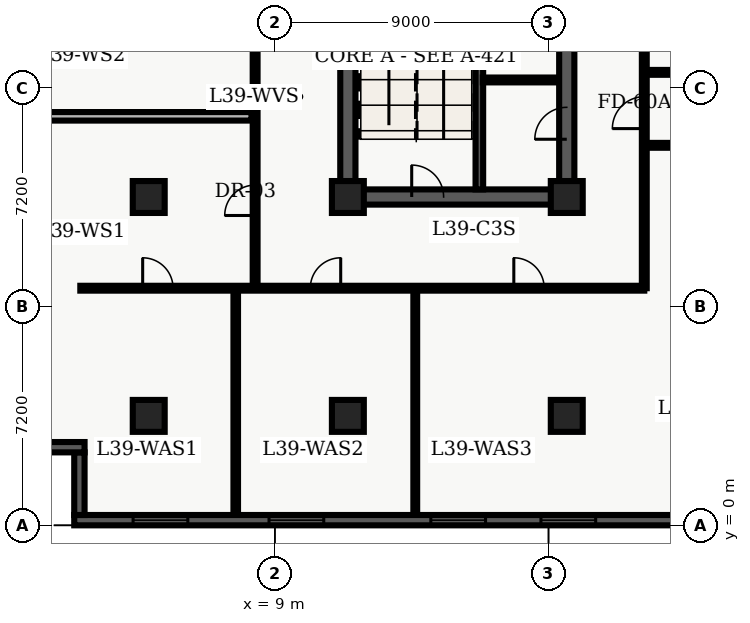
"""IFC4 building model, lengths in metres.
Left out: names, types, materials, properties, quantities, classifications, styles, units other than length and angle.
Written with IfcOpenShell. Run it as: python <this file> out.ifc"""

import sys

from ifc_helpers import new_model, entity, si_unit, converted_unit, direction, frame, origin_with_axes, origin_2d_with_axis, place, context, subcontext, project, spatial, polyline, rectangle, outline, extrude, element, fill, save


model = new_model("IFC4")
c1 = context("Model", 3, precision=1e-05, world=origin_with_axes(), true_north=direction((0.0, 1.0)))
c2 = subcontext(c1, "Body", "Model", "MODEL_VIEW")
j1 = project(units=[si_unit("LENGTHUNIT", "METRE"), converted_unit("PLANEANGLEUNIT", "DEGREE", entity("IfcPlaneAngleMeasure", 0.017), si_unit("PLANEANGLEUNIT", "RADIAN"), dimensions=[0, 0, 0, 0, 0, 0, 0])], contexts=[c1])
p1 = place(None, origin_with_axes())
s1 = spatial("IfcSite", under=j1, at=p1, CompositionType="ELEMENT")
p2 = place(p1, origin_with_axes())
s2 = spatial("IfcBuilding", under=s1, at=p2, CompositionType="ELEMENT")
p3 = place(p2, frame((0.0, 0.0, 160.2), z_axis=(0.0, 0.0, 1.0), x_axis=(1.0, 0.0, 0.0)))
s3 = spatial("IfcBuildingStorey", under=s2, at=p3, CompositionType="ELEMENT", Elevation=160.2)
p4 = place(p3, frame((11.4, 10.8, 0.0), z_axis=(0.0, 0.0, 1.0), x_axis=(0.0, 1.0, 0.0)))
e1 = element("IfcWall", 1, at=p4, inside=s3, PredefinedType="SHEAR", context=c2, shape_type="SweptSolid", body=[
    extrude(outline(polyline([(0.0, -0.25), (27.0, -0.25), (27.0, 0.25), (0.0, 0.25), (0.0, -0.25)])), origin_with_axes(), (0.0, 0.0, 1.0), 3.66),
])
p5 = place(p3, frame((11.4, 10.8, 0.0), z_axis=(0.0, 0.0, 1.0), x_axis=(1.0, 0.0, 0.0)))
e2 = element("IfcWall", 2, at=p5, inside=s3, PredefinedType="SHEAR", context=c2, shape_type="SweptSolid", body=[
    extrude(outline(polyline([(0.0, -0.25), (7.2, -0.25), (7.2, 0.25), (0.0, 0.25), (0.0, -0.25)])), origin_with_axes(), (0.0, 0.0, 1.0), 3.66),
])
p6 = place(p5, frame((2.625, 0.0, 0.0), z_axis=(0.0, 0.0, 1.0), x_axis=(1.0, 0.0, 0.0)))
e3 = element("IfcOpeningElement", 3, at=p6, cuts=e2, PredefinedType="OPENING", context=c2, shape_type="SweptSolid", body=[
    extrude(rectangle(XDim=1.05, YDim=0.52, at=origin_2d_with_axis()), origin_with_axes(), (0.0, 0.0, 1.0), 2.15),
])
p7 = place(p3, frame((18.6, 10.8, 0.0), z_axis=(0.0, 0.0, 1.0), x_axis=(0.0, 1.0, 0.0)))
e4 = element("IfcWall", 4, at=p7, inside=s3, PredefinedType="SHEAR", context=c2, shape_type="SweptSolid", body=[
    extrude(outline(polyline([(0.0, -0.25), (13.5, -0.25), (13.5, 0.25), (0.0, 0.25), (0.0, -0.25)])), origin_with_axes(), (0.0, 0.0, 1.0), 3.66),
])
p8 = place(p7, frame((11.125, 0.0, 0.0), z_axis=(0.0, 0.0, 1.0), x_axis=(1.0, 0.0, 0.0)))
e5 = element("IfcOpeningElement", 5, at=p8, cuts=e4, PredefinedType="OPENING", context=c2, shape_type="SweptSolid", body=[
    extrude(rectangle(XDim=1.05, YDim=0.52, at=origin_2d_with_axis()), origin_with_axes(), (0.0, 0.0, 1.0), 2.15),
])
p9 = place(p7, frame((2.425, 0.0, 0.0), z_axis=(0.0, 0.0, 1.0), x_axis=(1.0, 0.0, 0.0)))
e6 = element("IfcOpeningElement", 6, at=p9, cuts=e4, PredefinedType="OPENING", context=c2, shape_type="SweptSolid", body=[
    extrude(rectangle(XDim=1.05, YDim=0.52, at=origin_2d_with_axis()), origin_with_axes(), (0.0, 0.0, 1.0), 2.15),
])
p10 = place(p7, frame((6.625, 0.0, 0.0), z_axis=(0.0, 0.0, 1.0), x_axis=(1.0, 0.0, 0.0)))
e7 = element("IfcOpeningElement", 7, at=p10, cuts=e4, PredefinedType="OPENING", context=c2, shape_type="SweptSolid", body=[
    extrude(rectangle(XDim=1.05, YDim=0.52, at=origin_2d_with_axis()), origin_with_axes(), (0.0, 0.0, 1.0), 2.15),
])
p11 = place(p3, frame((15.725, 11.05, 0.0), z_axis=(0.0, 0.0, 1.0), x_axis=(0.0, 1.0, 0.0)))
e8 = element("IfcWall", 8, at=p11, inside=s3, PredefinedType="SHEAR", context=c2, shape_type="SweptSolid", body=[
    extrude(outline(polyline([(0.0, -0.125), (8.65, -0.125), (8.65, 0.125), (0.0, 0.125), (0.0, -0.125)])), origin_with_axes(), (0.0, 0.0, 1.0), 3.66),
])
for number, where, z_axis, x_axis in (
    (9, (11.4, 3.6, 0.0), (0.0, 0.0, 1.0), (1.0, 0.0, 0.0)),
    (10, (11.4, 10.8, 0.0), (0.0, 0.0, 1.0), (1.0, 0.0, 0.0)),
    (11, (18.6, 3.6, 0.0), (0.0, 0.0, 1.0), (1.0, 0.0, 0.0)),
    (12, (18.6, 10.8, 0.0), (0.0, 0.0, 1.0), (1.0, 0.0, 0.0)),
    (13, (4.85, 3.6, 0.0), (0.0, 0.0, 1.0), (1.0, 0.0, 0.0)),
    (14, (4.85, 10.8, 0.0), (0.0, 0.0, 1.0), (1.0, 0.0, 0.0)),
):
    element("IfcColumn", number, at=place(p3, frame(where, z_axis=z_axis, x_axis=x_axis)), inside=s3, PredefinedType="COLUMN", context=c2, shape_type="SweptSolid", body=[
        extrude(rectangle(XDim=1.05, YDim=1.05, at=origin_2d_with_axis()), origin_with_axes(), (0.0, 0.0, 1.0), 3.9),
    ])
p12 = place(p3, frame((15.84, 14.65, 0.0), z_axis=(0.0, 0.0, 1.0), x_axis=(1.0, 0.0, 0.0)))
e15 = element("IfcWall", 15, at=p12, inside=s3, PredefinedType="PARTITIONING", context=c2, shape_type="SweptSolid", body=[
    extrude(outline(polyline([(0.0, -0.08), (2.46, -0.08), (2.46, 0.08), (0.0, 0.08), (0.0, -0.08)])), origin_with_axes(), (0.0, 0.0, 1.0), 2.7),
])
p13 = place(p3, frame((2.6, 7.8, 0.0), z_axis=(0.0, 0.0, 1.0), x_axis=(1.0, 0.0, 0.0)))
e16 = element("IfcWall", 16, at=p13, inside=s3, PredefinedType="PARTITIONING", context=c2, shape_type="SweptSolid", body=[
    extrude(outline(polyline([(0.0, -0.08), (18.55, -0.08), (18.55, 0.08), (0.0, 0.08), (0.0, -0.08)])), origin_with_axes(), (0.0, 0.0, 1.0), 2.7),
])
p14 = place(p13, frame((2.551, 0.0, 0.0), z_axis=(0.0, 0.0, 1.0), x_axis=(1.0, 0.0, 0.0)))
e17 = element("IfcOpeningElement", 17, at=p14, cuts=e16, PredefinedType="OPENING", context=c2, shape_type="SweptSolid", body=[
    extrude(rectangle(XDim=1.0, YDim=0.18, at=origin_2d_with_axis()), origin_with_axes(), (0.0, 0.0, 1.0), 2.15),
])
p15 = place(p13, frame((8.065, 0.0, 0.0), z_axis=(0.0, 0.0, 1.0), x_axis=(1.0, 0.0, 0.0)))
e18 = element("IfcOpeningElement", 18, at=p15, cuts=e16, PredefinedType="OPENING", context=c2, shape_type="SweptSolid", body=[
    extrude(rectangle(XDim=1.0, YDim=0.18, at=origin_2d_with_axis()), origin_with_axes(), (0.0, 0.0, 1.0), 2.15),
])
p16 = place(p13, frame((14.758, 0.0, 0.0), z_axis=(0.0, 0.0, 1.0), x_axis=(1.0, 0.0, 0.0)))
e19 = element("IfcOpeningElement", 19, at=p16, cuts=e16, PredefinedType="OPENING", context=c2, shape_type="SweptSolid", body=[
    extrude(rectangle(XDim=1.0, YDim=0.18, at=origin_2d_with_axis()), origin_with_axes(), (0.0, 0.0, 1.0), 2.15),
])
p17 = place(p3, frame((21.15, 7.8, 0.0), z_axis=(0.0, 0.0, 1.0), x_axis=(0.0, 1.0, 0.0)))
e20 = element("IfcWall", 20, at=p17, inside=s3, PredefinedType="PARTITIONING", context=c2, shape_type="SweptSolid", body=[
    extrude(outline(polyline([(0.0, -0.08), (32.7, -0.08), (32.7, 0.08), (0.0, 0.08), (0.0, -0.08)])), origin_with_axes(), (0.0, 0.0, 1.0), 2.7),
])
p18 = place(p17, frame((5.775, 0.0, 0.0), z_axis=(0.0, 0.0, 1.0), x_axis=(1.0, 0.0, 0.0)))
e21 = element("IfcOpeningElement", 21, at=p18, cuts=e20, PredefinedType="OPENING", context=c2, shape_type="SweptSolid", body=[
    extrude(rectangle(XDim=1.05, YDim=0.18, at=origin_2d_with_axis()), origin_with_axes(), (0.0, 0.0, 1.0), 2.15),
])
p19 = place(p3, frame((8.35, 7.8, 0.0), z_axis=(0.0, 0.0, 1.0), x_axis=(0.0, 1.0, 0.0)))
e22 = element("IfcWall", 22, at=p19, inside=s3, PredefinedType="PARTITIONING", context=c2, shape_type="SweptSolid", body=[
    extrude(outline(polyline([(0.0, -0.08), (12.6, -0.08), (12.6, 0.08), (0.0, 0.08), (0.0, -0.08)])), origin_with_axes(), (0.0, 0.0, 1.0), 2.7),
])
p20 = place(p19, frame((2.892, 0.0, 0.0), z_axis=(0.0, 0.0, 1.0), x_axis=(1.0, 0.0, 0.0)))
e23 = element("IfcOpeningElement", 23, at=p20, cuts=e22, PredefinedType="OPENING", context=c2, shape_type="SweptSolid", body=[
    extrude(rectangle(XDim=1.0, YDim=0.18, at=origin_2d_with_axis()), origin_with_axes(), (0.0, 0.0, 1.0), 2.15),
])
p21 = place(p19, frame((9.087, 0.0, 0.0), z_axis=(0.0, 0.0, 1.0), x_axis=(1.0, 0.0, 0.0)))
e24 = element("IfcOpeningElement", 24, at=p21, cuts=e22, PredefinedType="OPENING", context=c2, shape_type="SweptSolid", body=[
    extrude(rectangle(XDim=1.0, YDim=0.18, at=origin_2d_with_axis()), origin_with_axes(), (0.0, 0.0, 1.0), 2.15),
])
p22 = place(p3, frame((0.335, 13.454, 0.0), z_axis=(0.0, 0.0, 1.0), x_axis=(1.0, 0.0, 0.0)))
e25 = element("IfcWall", 25, at=p22, inside=s3, PredefinedType="PARTITIONING", context=c2, shape_type="SweptSolid", body=[
    extrude(outline(polyline([(0.0, -0.14), (7.895, -0.14), (7.895, 0.14), (0.0, 0.14), (0.0, -0.14)])), origin_with_axes(), (0.0, 0.0, 1.0), 2.7),
])
p23 = place(p3, frame((7.712, 0.335, 0.0), z_axis=(0.0, 0.0, 1.0), x_axis=(0.0, 1.0, 0.0)))
e26 = element("IfcWall", 26, at=p23, inside=s3, PredefinedType="PARTITIONING", context=c2, shape_type="SweptSolid", body=[
    extrude(outline(polyline([(0.0, -0.075), (7.365, -0.075), (7.365, 0.075), (0.0, 0.075), (0.0, -0.075)])), origin_with_axes(), (0.0, 0.0, 1.0), 2.7),
])
p24 = place(p3, frame((13.617, 0.335, 0.0), z_axis=(0.0, 0.0, 1.0), x_axis=(0.0, 1.0, 0.0)))
e27 = element("IfcWall", 27, at=p24, inside=s3, PredefinedType="PARTITIONING", context=c2, shape_type="SweptSolid", body=[
    extrude(outline(polyline([(0.0, -0.062), (7.365, -0.062), (7.365, 0.062), (0.0, 0.062), (0.0, -0.062)])), origin_with_axes(), (0.0, 0.0, 1.0), 2.7),
])
p25 = place(p3, frame((21.15, 12.5, 0.0), z_axis=(0.0, 0.0, 1.0), x_axis=(1.0, 0.0, 0.0)))
e28 = element("IfcWall", 28, at=p25, inside=s3, PredefinedType="PARTITIONING", context=c2, shape_type="SweptSolid", body=[
    extrude(outline(polyline([(0.0, -0.08), (15.2, -0.08), (15.2, 0.08), (0.0, 0.08), (0.0, -0.08)])), origin_with_axes(), (0.0, 0.0, 1.0), 2.7),
])
p26 = place(p25, frame((3.468, 0.0, 0.0), z_axis=(0.0, 0.0, 1.0), x_axis=(1.0, 0.0, 0.0)))
e29 = element("IfcOpeningElement", 29, at=p26, cuts=e28, PredefinedType="OPENING", context=c2, shape_type="SweptSolid", body=[
    extrude(rectangle(XDim=1.0, YDim=0.18, at=origin_2d_with_axis()), origin_with_axes(), (0.0, 0.0, 1.0), 2.15),
])
p27 = place(p25, frame((10.938, 0.0, 0.0), z_axis=(0.0, 0.0, 1.0), x_axis=(1.0, 0.0, 0.0)))
e30 = element("IfcOpeningElement", 30, at=p27, cuts=e28, PredefinedType="OPENING", context=c2, shape_type="SweptSolid", body=[
    extrude(rectangle(XDim=1.2, YDim=0.18, at=origin_2d_with_axis()), origin_with_axes(), (0.0, 0.0, 1.0), 2.2),
])
p28 = place(p3, frame((21.15, 14.9, 0.0), z_axis=(0.0, 0.0, 1.0), x_axis=(1.0, 0.0, 0.0)))
e31 = element("IfcWall", 31, at=p28, inside=s3, PredefinedType="PARTITIONING", context=c2, shape_type="SweptSolid", body=[
    extrude(outline(polyline([(0.0, -0.08), (15.2, -0.08), (15.2, 0.08), (0.0, 0.08), (0.0, -0.08)])), origin_with_axes(), (0.0, 0.0, 1.0), 2.7),
])
p29 = place(p28, frame((1.942, 0.0, 0.0), z_axis=(0.0, 0.0, 1.0), x_axis=(1.0, 0.0, 0.0)))
e32 = element("IfcOpeningElement", 32, at=p29, cuts=e31, PredefinedType="OPENING", context=c2, shape_type="SweptSolid", body=[
    extrude(rectangle(XDim=1.0, YDim=0.18, at=origin_2d_with_axis()), origin_with_axes(), (0.0, 0.0, 1.0), 2.15),
])
p30 = place(p28, frame((5.077, 0.0, 0.0), z_axis=(0.0, 0.0, 1.0), x_axis=(1.0, 0.0, 0.0)))
e33 = element("IfcOpeningElement", 33, at=p30, cuts=e31, PredefinedType="OPENING", context=c2, shape_type="SweptSolid", body=[
    extrude(rectangle(XDim=1.0, YDim=0.18, at=origin_2d_with_axis()), origin_with_axes(), (0.0, 0.0, 1.0), 2.15),
])
p31 = place(p28, frame((9.281, 0.0, 0.0), z_axis=(0.0, 0.0, 1.0), x_axis=(1.0, 0.0, 0.0)))
e34 = element("IfcOpeningElement", 34, at=p31, cuts=e31, PredefinedType="OPENING", context=c2, shape_type="SweptSolid", body=[
    extrude(rectangle(XDim=1.0, YDim=0.18, at=origin_2d_with_axis()), origin_with_axes(), (0.0, 0.0, 1.0), 2.15),
])
p32 = place(p28, frame((13.617, 0.0, 0.0), z_axis=(0.0, 0.0, 1.0), x_axis=(1.0, 0.0, 0.0)))
e35 = element("IfcOpeningElement", 35, at=p32, cuts=e31, PredefinedType="OPENING", context=c2, shape_type="SweptSolid", body=[
    extrude(rectangle(XDim=1.0, YDim=0.18, at=origin_2d_with_axis()), origin_with_axes(), (0.0, 0.0, 1.0), 2.15),
])
p33 = place(p3, frame((57.26, 0.17, 0.0), z_axis=(0.0, 0.0, 1.0), x_axis=(-1.0, 0.0, 0.0)))
e36 = element("IfcWall", 36, at=p33, inside=s3, PredefinedType="SOLIDWALL", context=c2, shape_type="SweptSolid", body=[
    extrude(outline(polyline([(0.0, -0.17), (54.86, -0.17), (54.86, 0.17), (0.0, 0.17), (0.0, -0.17)])), origin_with_axes(), (0.0, 0.0, 1.0), 3.66),
])
p34 = place(p33, frame((2.836, 0.0, 0.45), z_axis=(0.0, 0.0, 1.0), x_axis=(1.0, 0.0, 0.0)))
e37 = element("IfcOpeningElement", 37, at=p34, cuts=e36, PredefinedType="OPENING", context=c2, shape_type="SweptSolid", body=[
    extrude(rectangle(XDim=1.8, YDim=0.36, at=origin_2d_with_axis()), origin_with_axes(), (0.0, 0.0, 1.0), 2.1),
])
p35 = place(p33, frame((7.307, 0.0, 0.45), z_axis=(0.0, 0.0, 1.0), x_axis=(1.0, 0.0, 0.0)))
e38 = element("IfcOpeningElement", 38, at=p35, cuts=e36, PredefinedType="OPENING", context=c2, shape_type="SweptSolid", body=[
    extrude(rectangle(XDim=1.8, YDim=0.36, at=origin_2d_with_axis()), origin_with_axes(), (0.0, 0.0, 1.0), 2.1),
])
p36 = place(p33, frame((11.779, 0.0, 0.45), z_axis=(0.0, 0.0, 1.0), x_axis=(1.0, 0.0, 0.0)))
e39 = element("IfcOpeningElement", 39, at=p36, cuts=e36, PredefinedType="OPENING", context=c2, shape_type="SweptSolid", body=[
    extrude(rectangle(XDim=1.8, YDim=0.36, at=origin_2d_with_axis()), origin_with_axes(), (0.0, 0.0, 1.0), 2.1),
])
p37 = place(p33, frame((16.251, 0.0, 0.45), z_axis=(0.0, 0.0, 1.0), x_axis=(1.0, 0.0, 0.0)))
e40 = element("IfcOpeningElement", 40, at=p37, cuts=e36, PredefinedType="OPENING", context=c2, shape_type="SweptSolid", body=[
    extrude(rectangle(XDim=1.8, YDim=0.36, at=origin_2d_with_axis()), origin_with_axes(), (0.0, 0.0, 1.0), 2.1),
])
p38 = place(p33, frame((20.723, 0.0, 0.45), z_axis=(0.0, 0.0, 1.0), x_axis=(1.0, 0.0, 0.0)))
e41 = element("IfcOpeningElement", 41, at=p38, cuts=e36, PredefinedType="OPENING", context=c2, shape_type="SweptSolid", body=[
    extrude(rectangle(XDim=1.8, YDim=0.36, at=origin_2d_with_axis()), origin_with_axes(), (0.0, 0.0, 1.0), 2.1),
])
p39 = place(p33, frame((25.194, 0.0, 0.45), z_axis=(0.0, 0.0, 1.0), x_axis=(1.0, 0.0, 0.0)))
e42 = element("IfcOpeningElement", 42, at=p39, cuts=e36, PredefinedType="OPENING", context=c2, shape_type="SweptSolid", body=[
    extrude(rectangle(XDim=1.8, YDim=0.36, at=origin_2d_with_axis()), origin_with_axes(), (0.0, 0.0, 1.0), 2.1),
])
p40 = place(p33, frame((34.138, 0.0, 0.45), z_axis=(0.0, 0.0, 1.0), x_axis=(1.0, 0.0, 0.0)))
e43 = element("IfcOpeningElement", 43, at=p40, cuts=e36, PredefinedType="OPENING", context=c2, shape_type="SweptSolid", body=[
    extrude(rectangle(XDim=1.8, YDim=0.36, at=origin_2d_with_axis()), origin_with_axes(), (0.0, 0.0, 1.0), 2.1),
])
p41 = place(p33, frame((38.609, 0.0, 0.45), z_axis=(0.0, 0.0, 1.0), x_axis=(1.0, 0.0, 0.0)))
e44 = element("IfcOpeningElement", 44, at=p41, cuts=e36, PredefinedType="OPENING", context=c2, shape_type="SweptSolid", body=[
    extrude(rectangle(XDim=1.8, YDim=0.36, at=origin_2d_with_axis()), origin_with_axes(), (0.0, 0.0, 1.0), 2.1),
])
p42 = place(p33, frame((42.231, 0.0, 0.45), z_axis=(0.0, 0.0, 1.0), x_axis=(1.0, 0.0, 0.0)))
e45 = element("IfcOpeningElement", 45, at=p42, cuts=e36, PredefinedType="OPENING", context=c2, shape_type="SweptSolid", body=[
    extrude(rectangle(XDim=1.8, YDim=0.36, at=origin_2d_with_axis()), origin_with_axes(), (0.0, 0.0, 1.0), 2.1),
])
p43 = place(p33, frame((47.553, 0.0, 0.45), z_axis=(0.0, 0.0, 1.0), x_axis=(1.0, 0.0, 0.0)))
e46 = element("IfcOpeningElement", 46, at=p43, cuts=e36, PredefinedType="OPENING", context=c2, shape_type="SweptSolid", body=[
    extrude(rectangle(XDim=1.8, YDim=0.36, at=origin_2d_with_axis()), origin_with_axes(), (0.0, 0.0, 1.0), 2.1),
])
p44 = place(p33, frame((52.024, 0.0, 0.45), z_axis=(0.0, 0.0, 1.0), x_axis=(1.0, 0.0, 0.0)))
e47 = element("IfcOpeningElement", 47, at=p44, cuts=e36, PredefinedType="OPENING", context=c2, shape_type="SweptSolid", body=[
    extrude(rectangle(XDim=1.8, YDim=0.36, at=origin_2d_with_axis()), origin_with_axes(), (0.0, 0.0, 1.0), 2.1),
])
p45 = place(p3, frame((2.57, 0.34, 0.0), z_axis=(0.0, 0.0, 1.0), x_axis=(0.0, 1.0, 0.0)))
e48 = element("IfcWall", 48, at=p45, inside=s3, PredefinedType="SOLIDWALL", context=c2, shape_type="SweptSolid", body=[
    extrude(outline(polyline([(0.0, -0.17), (2.06, -0.17), (2.06, 0.17), (0.0, 0.17), (0.0, -0.17)])), origin_with_axes(), (0.0, 0.0, 1.0), 3.66),
])
p46 = place(p3, frame((2.74, 2.57, 0.0), z_axis=(0.0, 0.0, 1.0), x_axis=(-1.0, 0.0, 0.0)))
e49 = element("IfcWall", 49, at=p46, inside=s3, PredefinedType="SOLIDWALL", context=c2, shape_type="SweptSolid", body=[
    extrude(outline(polyline([(0.0, -0.17), (2.74, -0.17), (2.74, 0.17), (0.0, 0.17), (0.0, -0.17)])), origin_with_axes(), (0.0, 0.0, 1.0), 3.66),
])
p47 = place(p5, frame((2.625, 0.0, 0.0), z_axis=(0.0, 0.0, 1.0), x_axis=(1.0, 0.0, 0.0)))
e50 = element("IfcDoor", 50, at=p47, inside=s3, OperationType="SINGLE_SWING_LEFT", PredefinedType="DOOR", context=c2, shape_type="SweptSolid", body=[
    extrude(rectangle(XDim=1.05, YDim=0.09, at=origin_2d_with_axis()), origin_with_axes(), (0.0, 0.0, 1.0), 2.15),
])
fill(e3, e50)
p48 = place(p7, frame((2.425, 0.0, 0.0), z_axis=(0.0, 0.0, 1.0), x_axis=(1.0, 0.0, 0.0)))
e51 = element("IfcDoor", 51, at=p48, inside=s3, OperationType="SINGLE_SWING_LEFT", PredefinedType="DOOR", context=c2, shape_type="SweptSolid", body=[
    extrude(rectangle(XDim=1.05, YDim=0.09, at=origin_2d_with_axis()), origin_with_axes(), (0.0, 0.0, 1.0), 2.15),
])
fill(e6, e51)
p49 = place(p19, frame((2.892, 0.0, 0.0), z_axis=(0.0, 0.0, 1.0), x_axis=(1.0, 0.0, 0.0)))
e52 = element("IfcDoor", 52, at=p49, inside=s3, OperationType="SINGLE_SWING_LEFT", PredefinedType="DOOR", context=c2, shape_type="SweptSolid", body=[
    extrude(rectangle(XDim=1.0, YDim=0.09, at=origin_2d_with_axis()), origin_with_axes(), (0.0, 0.0, 1.0), 2.15),
])
fill(e23, e52)
p50 = place(p13, frame((2.551, 0.0, 0.0), z_axis=(0.0, 0.0, 1.0), x_axis=(1.0, 0.0, 0.0)))
e53 = element("IfcDoor", 53, at=p50, inside=s3, OperationType="SINGLE_SWING_LEFT", PredefinedType="DOOR", context=c2, shape_type="SweptSolid", body=[
    extrude(rectangle(XDim=1.0, YDim=0.09, at=origin_2d_with_axis()), origin_with_axes(), (0.0, 0.0, 1.0), 2.15),
])
fill(e17, e53)
p51 = place(p13, frame((8.065, 0.0, 0.0), z_axis=(0.0, 0.0, 1.0), x_axis=(1.0, 0.0, 0.0)))
e54 = element("IfcDoor", 54, at=p51, inside=s3, OperationType="SINGLE_SWING_RIGHT", PredefinedType="DOOR", context=c2, shape_type="SweptSolid", body=[
    extrude(rectangle(XDim=1.0, YDim=0.09, at=origin_2d_with_axis()), origin_with_axes(), (0.0, 0.0, 1.0), 2.15),
])
fill(e18, e54)
p52 = place(p13, frame((14.758, 0.0, 0.0), z_axis=(0.0, 0.0, 1.0), x_axis=(1.0, 0.0, 0.0)))
e55 = element("IfcDoor", 55, at=p52, inside=s3, OperationType="SINGLE_SWING_LEFT", PredefinedType="DOOR", context=c2, shape_type="SweptSolid", body=[
    extrude(rectangle(XDim=1.0, YDim=0.09, at=origin_2d_with_axis()), origin_with_axes(), (0.0, 0.0, 1.0), 2.15),
])
fill(e19, e55)
p53 = place(p17, frame((5.775, 0.0, 0.0), z_axis=(0.0, 0.0, 1.0), x_axis=(1.0, 0.0, 0.0)))
e56 = element("IfcDoor", 56, at=p53, inside=s3, OperationType="SINGLE_SWING_LEFT", PredefinedType="DOOR", context=c2, shape_type="SweptSolid", body=[
    extrude(rectangle(XDim=1.05, YDim=0.09, at=origin_2d_with_axis()), origin_with_axes(), (0.0, 0.0, 1.0), 2.15),
])
fill(e21, e56)
p54 = place(p33, frame((38.609, 0.0, 0.45), z_axis=(0.0, 0.0, 1.0), x_axis=(1.0, 0.0, 0.0)))
e57 = element("IfcWindow", 57, at=p54, inside=s3, PredefinedType="WINDOW", context=c2, shape_type="SweptSolid", body=[
    extrude(rectangle(XDim=1.8, YDim=0.09, at=origin_2d_with_axis()), origin_with_axes(), (0.0, 0.0, 1.0), 2.1),
])
fill(e44, e57)
p55 = place(p33, frame((42.231, 0.0, 0.45), z_axis=(0.0, 0.0, 1.0), x_axis=(1.0, 0.0, 0.0)))
e58 = element("IfcWindow", 58, at=p55, inside=s3, PredefinedType="WINDOW", context=c2, shape_type="SweptSolid", body=[
    extrude(rectangle(XDim=1.8, YDim=0.09, at=origin_2d_with_axis()), origin_with_axes(), (0.0, 0.0, 1.0), 2.1),
])
fill(e45, e58)
p56 = place(p33, frame((47.553, 0.0, 0.45), z_axis=(0.0, 0.0, 1.0), x_axis=(1.0, 0.0, 0.0)))
e59 = element("IfcWindow", 59, at=p56, inside=s3, PredefinedType="WINDOW", context=c2, shape_type="SweptSolid", body=[
    extrude(rectangle(XDim=1.8, YDim=0.09, at=origin_2d_with_axis()), origin_with_axes(), (0.0, 0.0, 1.0), 2.1),
])
fill(e46, e59)
p57 = place(p33, frame((52.024, 0.0, 0.45), z_axis=(0.0, 0.0, 1.0), x_axis=(1.0, 0.0, 0.0)))
e60 = element("IfcWindow", 60, at=p57, inside=s3, PredefinedType="WINDOW", context=c2, shape_type="SweptSolid", body=[
    extrude(rectangle(XDim=1.8, YDim=0.09, at=origin_2d_with_axis()), origin_with_axes(), (0.0, 0.0, 1.0), 2.1),
])
fill(e47, e60)
save(model, sys.argv[1])
